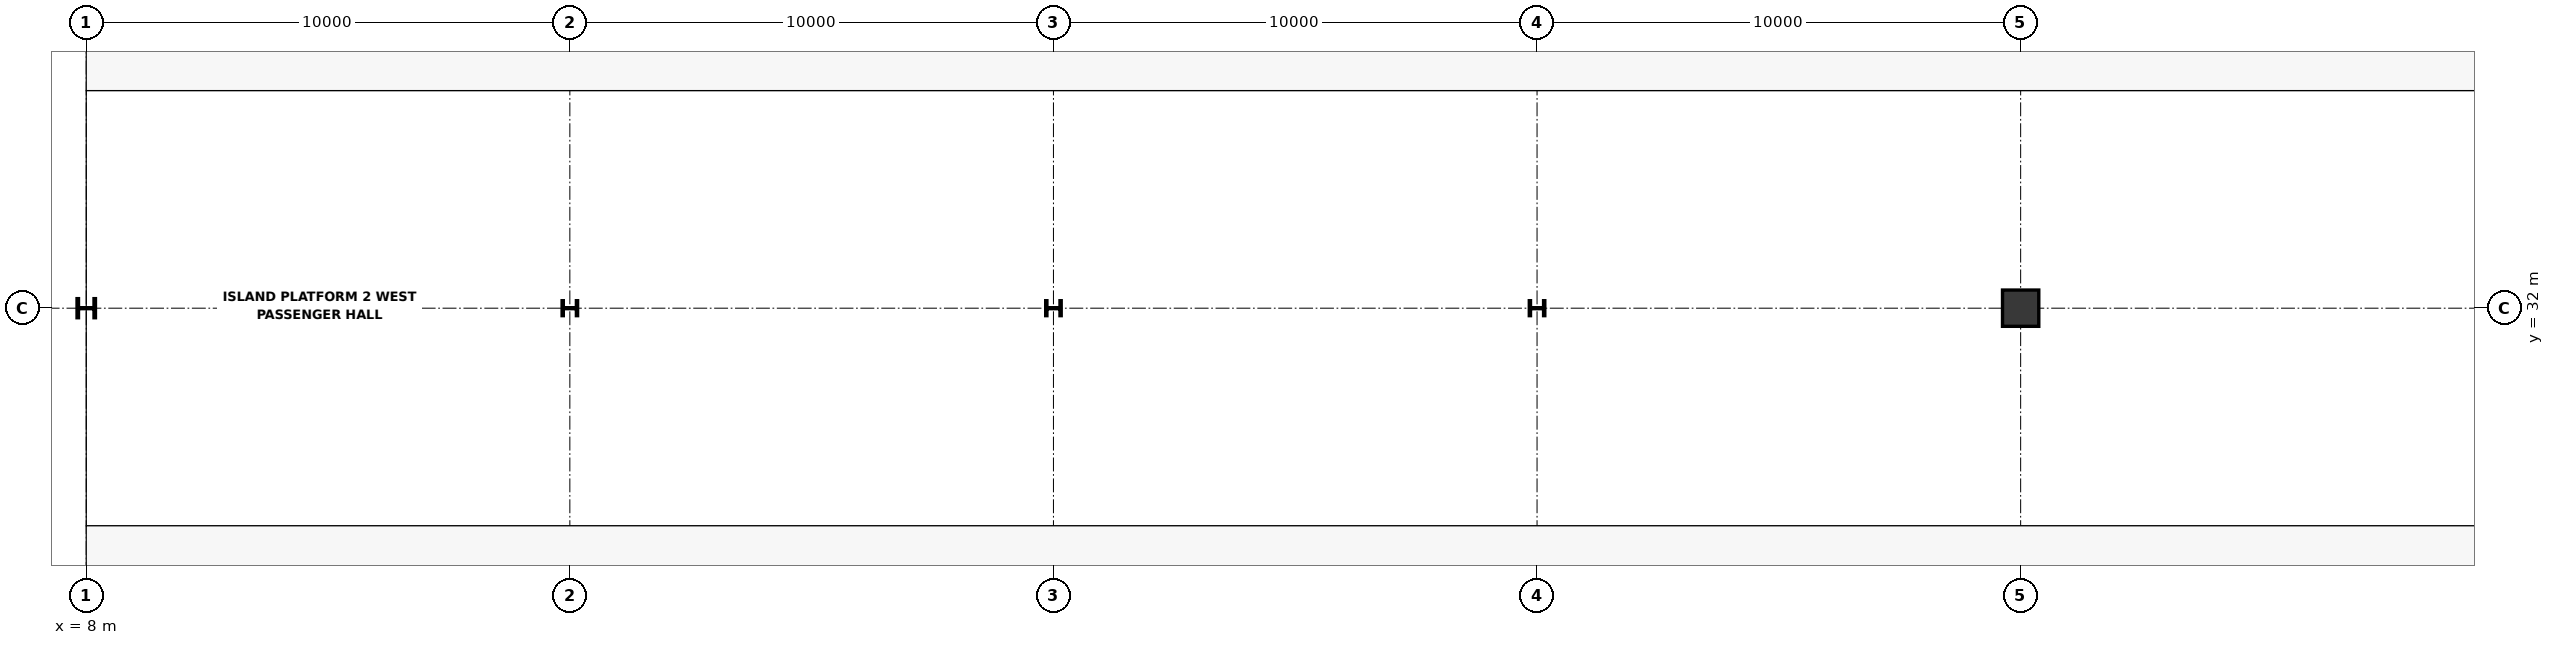
"""IFC4 building model, lengths in metres.
Left out: names, types, materials, properties, quantities, classifications, styles, units other than length and angle.
Written with IfcOpenShell. Run it as: python <this file> out.ifc"""

import sys

from ifc_helpers import new_model, si_unit, direction, frame, origin, origin_2d, place, context, subcontext, project, spatial, rectangle, i_section, extrude, element, save


model = new_model("IFC4")
c1 = context("Model", 3, precision=1e-05, world=origin(), true_north=direction((0.0, 1.0)))
c2 = subcontext(c1, "Body", "Model", "MODEL_VIEW")
j1 = project(units=[si_unit("LENGTHUNIT", "METRE"), si_unit("PLANEANGLEUNIT", "RADIAN")], contexts=[c1])
p1 = place(None, origin())
s1 = spatial("IfcSite", under=j1, at=p1, CompositionType="ELEMENT")
p2 = place(p1, origin())
s2 = spatial("IfcBuilding", under=s1, at=p2, CompositionType="ELEMENT")
p3 = place(p2, origin())
s3 = spatial("IfcBuildingStorey", under=s2, at=p3, CompositionType="ELEMENT", Elevation=0.0)
p4 = place(p3, frame((8.0, 32.0, 0.0), z_axis=(0.0, 0.0, 1.0), x_axis=(1.0, 0.0, 0.0)))
e1 = element("IfcColumn", 1, at=p4, inside=s3, PredefinedType="COLUMN", context=c2, shape_type="SweptSolid", body=[
    extrude(i_section(OverallWidth=0.395, OverallDepth=0.381, WebThickness=0.018, FlangeThickness=0.03, FilletRadius=0.015, at=origin_2d()), origin(), (0.0, 0.0, 1.0), 5.4),
])
for number, where, z_axis, x_axis in (
    (2, (18.0, 32.0, 0.0), (0.0, 0.0, 1.0), (1.0, 0.0, 0.0)),
    (3, (28.0, 32.0, 0.0), (0.0, 0.0, 1.0), (1.0, 0.0, 0.0)),
    (4, (38.0, 32.0, 0.0), (0.0, 0.0, 1.0), (1.0, 0.0, 0.0)),
):
    element("IfcColumn", number, at=place(p3, frame(where, z_axis=z_axis, x_axis=x_axis)), inside=s3, PredefinedType="COLUMN", context=c2, shape_type="SweptSolid", body=[
        extrude(i_section(OverallWidth=0.309, OverallDepth=0.321, WebThickness=0.014, FlangeThickness=0.022, FilletRadius=0.015, at=origin_2d()), origin(), (0.0, 0.0, 1.0), 5.4),
    ])
p5 = place(p3, frame((48.0, 32.0, 0.0), z_axis=(0.0, 0.0, 1.0), x_axis=(1.0, 0.0, 0.0)))
e5 = element("IfcColumn", 5, at=p5, inside=s3, PredefinedType="COLUMN", context=c2, shape_type="SweptSolid", body=[
    extrude(rectangle(XDim=0.75, YDim=0.75, at=origin_2d()), origin(), (0.0, 0.0, 1.0), 5.4),
])
save(model, sys.argv[1])
